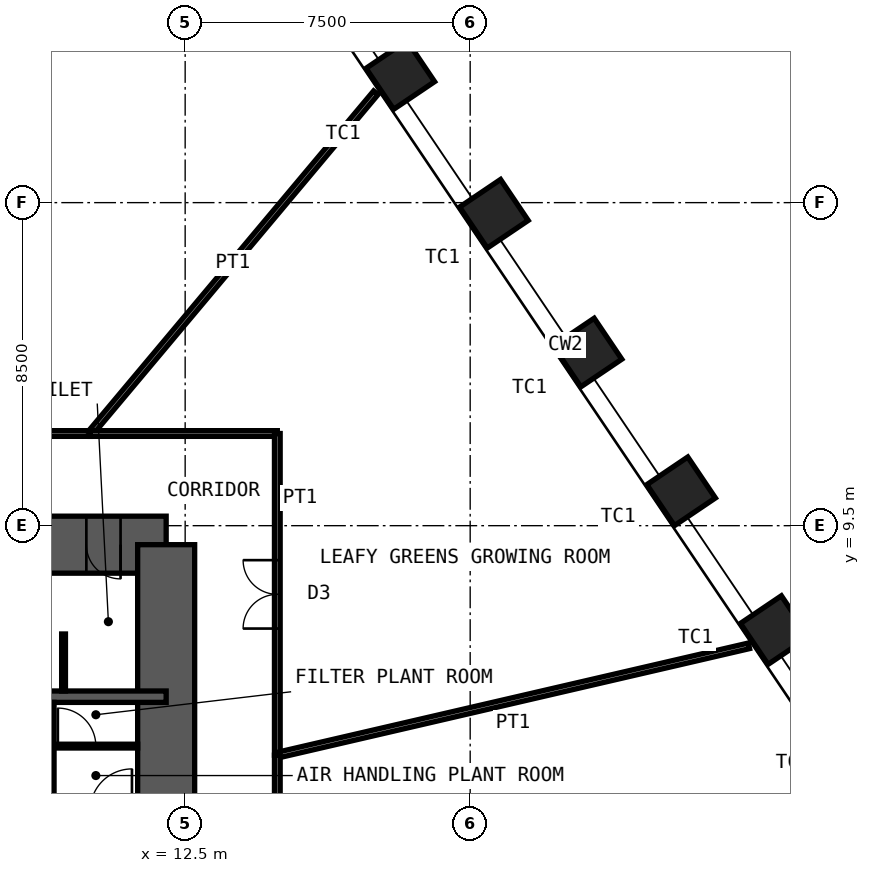
"""IFC4 building model, lengths in metres.
Left out: names, types, materials, properties, quantities, classifications, styles, units other than length and angle.
Written with IfcOpenShell. Run it as: python <this file> out.ifc"""

import sys

from ifc_helpers import new_model, si_unit, direction, frame, frame_2d, origin, origin_2d, place, context, subcontext, project, spatial, rectangle, hollow_rectangle, extrude, element, fill, save


model = new_model("IFC4")
c1 = context("Model", 3, precision=1e-05, world=origin(), true_north=direction((0.0, 1.0)))
c2 = subcontext(c1, "Body", "Model", "MODEL_VIEW")
j1 = project(units=[si_unit("LENGTHUNIT", "METRE"), si_unit("PLANEANGLEUNIT", "RADIAN")], contexts=[c1])
p1 = place(None, origin())
s1 = spatial("IfcSite", under=j1, at=p1, CompositionType="ELEMENT")
p2 = place(p1, origin())
s2 = spatial("IfcBuilding", under=s1, at=p2, CompositionType="ELEMENT")
p3 = place(p2, frame((0.0, 0.0, 22.0)))
s3 = spatial("IfcBuildingStorey", under=s2, at=p3, CompositionType="ELEMENT", Elevation=22.0)
for number, where, z_axis, x_axis in (
    (1, (18.161, 21.359, 0.0), (0.0, 0.0, 1.0), (-0.559, 0.829, 0.0)),
    (2, (20.624, 17.707, 0.0), (0.0, 0.0, 1.0), (-0.559, 0.829, 0.0)),
    (3, (23.087, 14.056, 0.0), (0.0, 0.0, 1.0), (-0.559, 0.829, 0.0)),
    (4, (25.55, 10.404, 0.0), (0.0, 0.0, 1.0), (-0.559, 0.829, 0.0)),
    (5, (28.013, 6.752, 0.0), (0.0, 0.0, 1.0), (-0.559, 0.829, 0.0)),
):
    element("IfcColumn", number, at=place(p3, frame(where, z_axis=z_axis, x_axis=x_axis)), inside=s3, PredefinedType="COLUMN", context=c2, shape_type="SweptSolid", body=[
        extrude(hollow_rectangle(XDim=1.3, YDim=1.3, WallThickness=0.1, at=origin_2d()), origin(), (0.0, 0.0, 1.0), 5.0),
    ])
p4 = place(p3, frame((-12.0, 9.0, 0.0), z_axis=(0.0, 0.0, 1.0), x_axis=(1.0, 0.0, 0.0)))
e6 = element("IfcWall", 6, at=p4, inside=s3, PredefinedType="SHEAR", context=c2, shape_type="SweptSolid", body=[
    extrude(rectangle(XDim=24.0, YDim=1.5, at=frame_2d((12.0, 0.0))), origin(), (0.0, 0.0, 1.0), 5.0),
])
p5 = place(p4, frame((10.4, 0.0, 0.0)))
e7 = element("IfcOpeningElement", 7, at=p5, cuts=e6, PredefinedType="OPENING", context=c2, shape_type="SweptSolid", body=[
    extrude(rectangle(XDim=1.0, YDim=2.1, at=frame_2d((0.5, 1.05))), frame((0.0, 0.76, 0.0), z_axis=(0.0, -1.0, 0.0), x_axis=(1.0, 0.0, 0.0)), (0.0, 0.0, 1.0), 1.52),
])
p6 = place(p4, frame((17.6, 0.0, 0.0)))
e8 = element("IfcOpeningElement", 8, at=p6, cuts=e6, PredefinedType="OPENING", context=c2, shape_type="SweptSolid", body=[
    extrude(rectangle(XDim=0.9, YDim=2.1, at=frame_2d((0.45, 1.05))), frame((0.0, 0.76, 0.0), z_axis=(0.0, -1.0, 0.0), x_axis=(1.0, 0.0, 0.0)), (0.0, 0.0, 1.0), 1.52),
])
p7 = place(p4, frame((21.9, 0.0, 0.0)))
e9 = element("IfcOpeningElement", 9, at=p7, cuts=e6, PredefinedType="OPENING", context=c2, shape_type="SweptSolid", body=[
    extrude(rectangle(XDim=0.9, YDim=2.1, at=frame_2d((0.45, 1.05))), frame((0.0, 0.76, 0.0), z_axis=(0.0, -1.0, 0.0), x_axis=(1.0, 0.0, 0.0)), (0.0, 0.0, 1.0), 1.52),
])
p8 = place(p3, frame((12.0, -9.0, 0.0), z_axis=(0.0, 0.0, 1.0), x_axis=(0.0, 1.0, 0.0)))
e10 = element("IfcWall", 10, at=p8, inside=s3, PredefinedType="SHEAR", context=c2, shape_type="SweptSolid", body=[
    extrude(rectangle(XDim=18.0, YDim=1.5, at=frame_2d((9.0, 0.0))), origin(), (0.0, 0.0, 1.0), 5.0),
])
p9 = place(p8, frame((8.1, 0.0, 0.0)))
e11 = element("IfcOpeningElement", 11, at=p9, cuts=e10, PredefinedType="OPENING", context=c2, shape_type="SweptSolid", body=[
    extrude(rectangle(XDim=1.8, YDim=2.1, at=frame_2d((0.9, 1.05))), frame((0.0, 0.76, 0.0), z_axis=(0.0, -1.0, 0.0), x_axis=(1.0, 0.0, 0.0)), (0.0, 0.0, 1.0), 1.52),
])
p10 = place(p3, frame((-12.0, 5.0, 0.0), z_axis=(0.0, 0.0, 1.0), x_axis=(1.0, 0.0, 0.0)))
e12 = element("IfcWall", 12, at=p10, inside=s3, PredefinedType="SHEAR", context=c2, shape_type="SweptSolid", body=[
    extrude(rectangle(XDim=24.0, YDim=0.3, at=frame_2d((12.0, 0.0))), origin(), (0.0, 0.0, 1.0), 5.0),
])
p11 = place(p3, frame((8.9, 2.2, 0.0), z_axis=(0.0, 0.0, 1.0), x_axis=(0.0, 1.0, 0.0)))
e13 = element("IfcWall", 13, at=p11, inside=s3, PredefinedType="PARTITIONING", context=c2, shape_type="SweptSolid", body=[
    extrude(rectangle(XDim=2.65, YDim=0.3, at=frame_2d((1.325, 0.0))), origin(), (0.0, 0.0, 1.0), 4.78),
])
p12 = place(p3, frame((9.05, 3.7, 0.0), z_axis=(0.0, 0.0, 1.0), x_axis=(1.0, 0.0, 0.0)))
e14 = element("IfcWall", 14, at=p12, inside=s3, PredefinedType="PARTITIONING", context=c2, shape_type="SweptSolid", body=[
    extrude(rectangle(XDim=2.2, YDim=0.1, at=frame_2d((1.1, 0.0))), origin(), (0.0, 0.0, 1.0), 4.78),
])
p13 = place(p12, frame((0.1, 0.0, 0.0)))
e15 = element("IfcOpeningElement", 15, at=p13, cuts=e14, PredefinedType="OPENING", context=c2, shape_type="SweptSolid", body=[
    extrude(rectangle(XDim=1.0, YDim=2.4, at=frame_2d((0.5, 1.2))), frame((0.0, 0.06, 0.0), z_axis=(0.0, -1.0, 0.0), x_axis=(1.0, 0.0, 0.0)), (0.0, 0.0, 1.0), 0.12),
])
p14 = place(p3, frame((9.3, 5.15, 0.0), z_axis=(0.0, 0.0, 1.0), x_axis=(0.0, 1.0, 0.0)))
e16 = element("IfcWall", 16, at=p14, inside=s3, PredefinedType="PARTITIONING", context=c2, shape_type="SweptSolid", body=[
    extrude(rectangle(XDim=1.5, YDim=0.1, at=frame_2d((0.75, 0.0))), origin(), (0.0, 0.0, 1.0), 2.1),
])
p15 = place(p3, frame((-4.564, 11.925, 0.0), z_axis=(0.0, 0.0, 1.0), x_axis=(1.0, 0.0, 0.0)))
e17 = element("IfcWall", 17, at=p15, inside=s3, PredefinedType="PARTITIONING", context=c2, shape_type="SweptSolid", body=[
    extrude(rectangle(XDim=14.563, YDim=0.15, at=frame_2d((7.282, 0.0))), origin(), (0.0, 0.0, 1.0), 4.8),
])
p16 = place(p15, frame((6.382, 0.0, 0.0)))
e18 = element("IfcOpeningElement", 18, at=p16, cuts=e17, PredefinedType="OPENING", context=c2, shape_type="SweptSolid", body=[
    extrude(rectangle(XDim=1.8, YDim=2.4, at=frame_2d((0.9, 1.2))), frame((0.0, 0.085, 0.0), z_axis=(0.0, -1.0, 0.0), x_axis=(1.0, 0.0, 0.0)), (0.0, 0.0, 1.0), 0.17),
])
p17 = place(p3, frame((17.517, 20.891, 0.0), z_axis=(0.0, 0.0, 1.0), x_axis=(-0.642515050703, -0.766273064658, 0.0)))
e19 = element("IfcWall", 19, at=p17, inside=s3, PredefinedType="PARTITIONING", context=c2, shape_type="SweptSolid", body=[
    extrude(rectangle(XDim=11.7, YDim=0.15, at=frame_2d((5.85, 0.0))), origin(), (0.0, 0.0, 1.0), 3.7),
])
p18 = place(p3, frame((9.999, 11.925, 0.0), z_axis=(0.0, 0.0, 1.0), x_axis=(1.0, 0.0, 0.0)))
e20 = element("IfcWall", 20, at=p18, inside=s3, PredefinedType="PARTITIONING", context=c2, shape_type="SweptSolid", body=[
    extrude(rectangle(XDim=4.926, YDim=0.15, at=frame_2d((2.463, 0.0))), origin(), (0.0, 0.0, 1.0), 4.8),
])
p19 = place(p3, frame((14.925, 11.925, 0.0), z_axis=(0.0, 0.0, 1.0), x_axis=(0.0, -1.0, 0.0)))
e21 = element("IfcWall", 21, at=p19, inside=s3, PredefinedType="PARTITIONING", context=c2, shape_type="SweptSolid", body=[
    extrude(rectangle(XDim=8.464, YDim=0.15, at=frame_2d((4.232, 0.0))), origin(), (0.0, 0.0, 1.0), 4.8),
])
p20 = place(p19, frame((3.332, 0.0, 0.0)))
e22 = element("IfcOpeningElement", 22, at=p20, cuts=e21, PredefinedType="OPENING", context=c2, shape_type="SweptSolid", body=[
    extrude(rectangle(XDim=1.8, YDim=2.4, at=frame_2d((0.9, 1.2))), frame((0.0, 0.085, 0.0), z_axis=(0.0, -1.0, 0.0), x_axis=(1.0, 0.0, 0.0)), (0.0, 0.0, 1.0), 0.17),
])
p21 = place(p3, frame((27.336, 6.338, 0.0), z_axis=(0.0, 0.0, 1.0), x_axis=(-0.97415520937, -0.22587967606, 0.0)))
e23 = element("IfcWall", 23, at=p21, inside=s3, PredefinedType="PARTITIONING", context=c2, shape_type="SweptSolid", body=[
    extrude(rectangle(XDim=12.74, YDim=0.15, at=frame_2d((6.37, 0.0))), origin(), (0.0, 0.0, 1.0), 3.7),
])
p22 = place(p3, frame((14.925, 3.461, 0.0), z_axis=(0.0, 0.0, 1.0), x_axis=(0.0, -1.0, 0.0)))
e24 = element("IfcWall", 24, at=p22, inside=s3, PredefinedType="PARTITIONING", context=c2, shape_type="SweptSolid", body=[
    extrude(rectangle(XDim=5.839, YDim=0.15, at=frame_2d((2.919, 0.0))), origin(), (0.0, 0.0, 1.0), 4.8),
])
p23 = place(p22, frame((2.42, 0.0, 0.0)))
e25 = element("IfcOpeningElement", 25, at=p23, cuts=e24, PredefinedType="OPENING", context=c2, shape_type="SweptSolid", body=[
    extrude(rectangle(XDim=1.0, YDim=2.4, at=frame_2d((0.5, 1.2))), frame((0.0, 0.085, 0.0), z_axis=(0.0, -1.0, 0.0), x_axis=(1.0, 0.0, 0.0)), (0.0, 0.0, 1.0), 0.17),
])
p24 = place(p7, origin())
e26 = element("IfcDoor", 26, at=p24, inside=s3, OperationType="SINGLE_SWING_RIGHT", PredefinedType="DOOR", context=c2, shape_type="SweptSolid", body=[
    extrude(rectangle(XDim=0.9, YDim=2.1, at=frame_2d((0.45, 1.05))), frame((0.0, 0.025, 0.0), z_axis=(0.0, -1.0, 0.0), x_axis=(1.0, 0.0, 0.0)), (0.0, 0.0, 1.0), 0.05),
])
fill(e9, e26)
p25 = place(p13, origin())
e27 = element("IfcDoor", 27, at=p25, inside=s3, OperationType="SINGLE_SWING_RIGHT", PredefinedType="DOOR", context=c2, shape_type="SweptSolid", body=[
    extrude(rectangle(XDim=1.0, YDim=2.4, at=frame_2d((0.5, 1.2))), frame((0.0, 0.025, 0.0), z_axis=(0.0, -1.0, 0.0), x_axis=(1.0, 0.0, 0.0)), (0.0, 0.0, 1.0), 0.05),
])
fill(e15, e27)
p26 = place(p20, origin())
e28 = element("IfcDoor", 28, at=p26, inside=s3, OperationType="DOUBLE_DOOR_DOUBLE_SWING", PredefinedType="DOOR", context=c2, shape_type="SweptSolid", body=[
    extrude(rectangle(XDim=1.8, YDim=2.4, at=frame_2d((0.9, 1.2))), frame((0.0, 0.025, 0.0), z_axis=(0.0, -1.0, 0.0), x_axis=(1.0, 0.0, 0.0)), (0.0, 0.0, 1.0), 0.05),
])
fill(e22, e28)
save(model, sys.argv[1])
